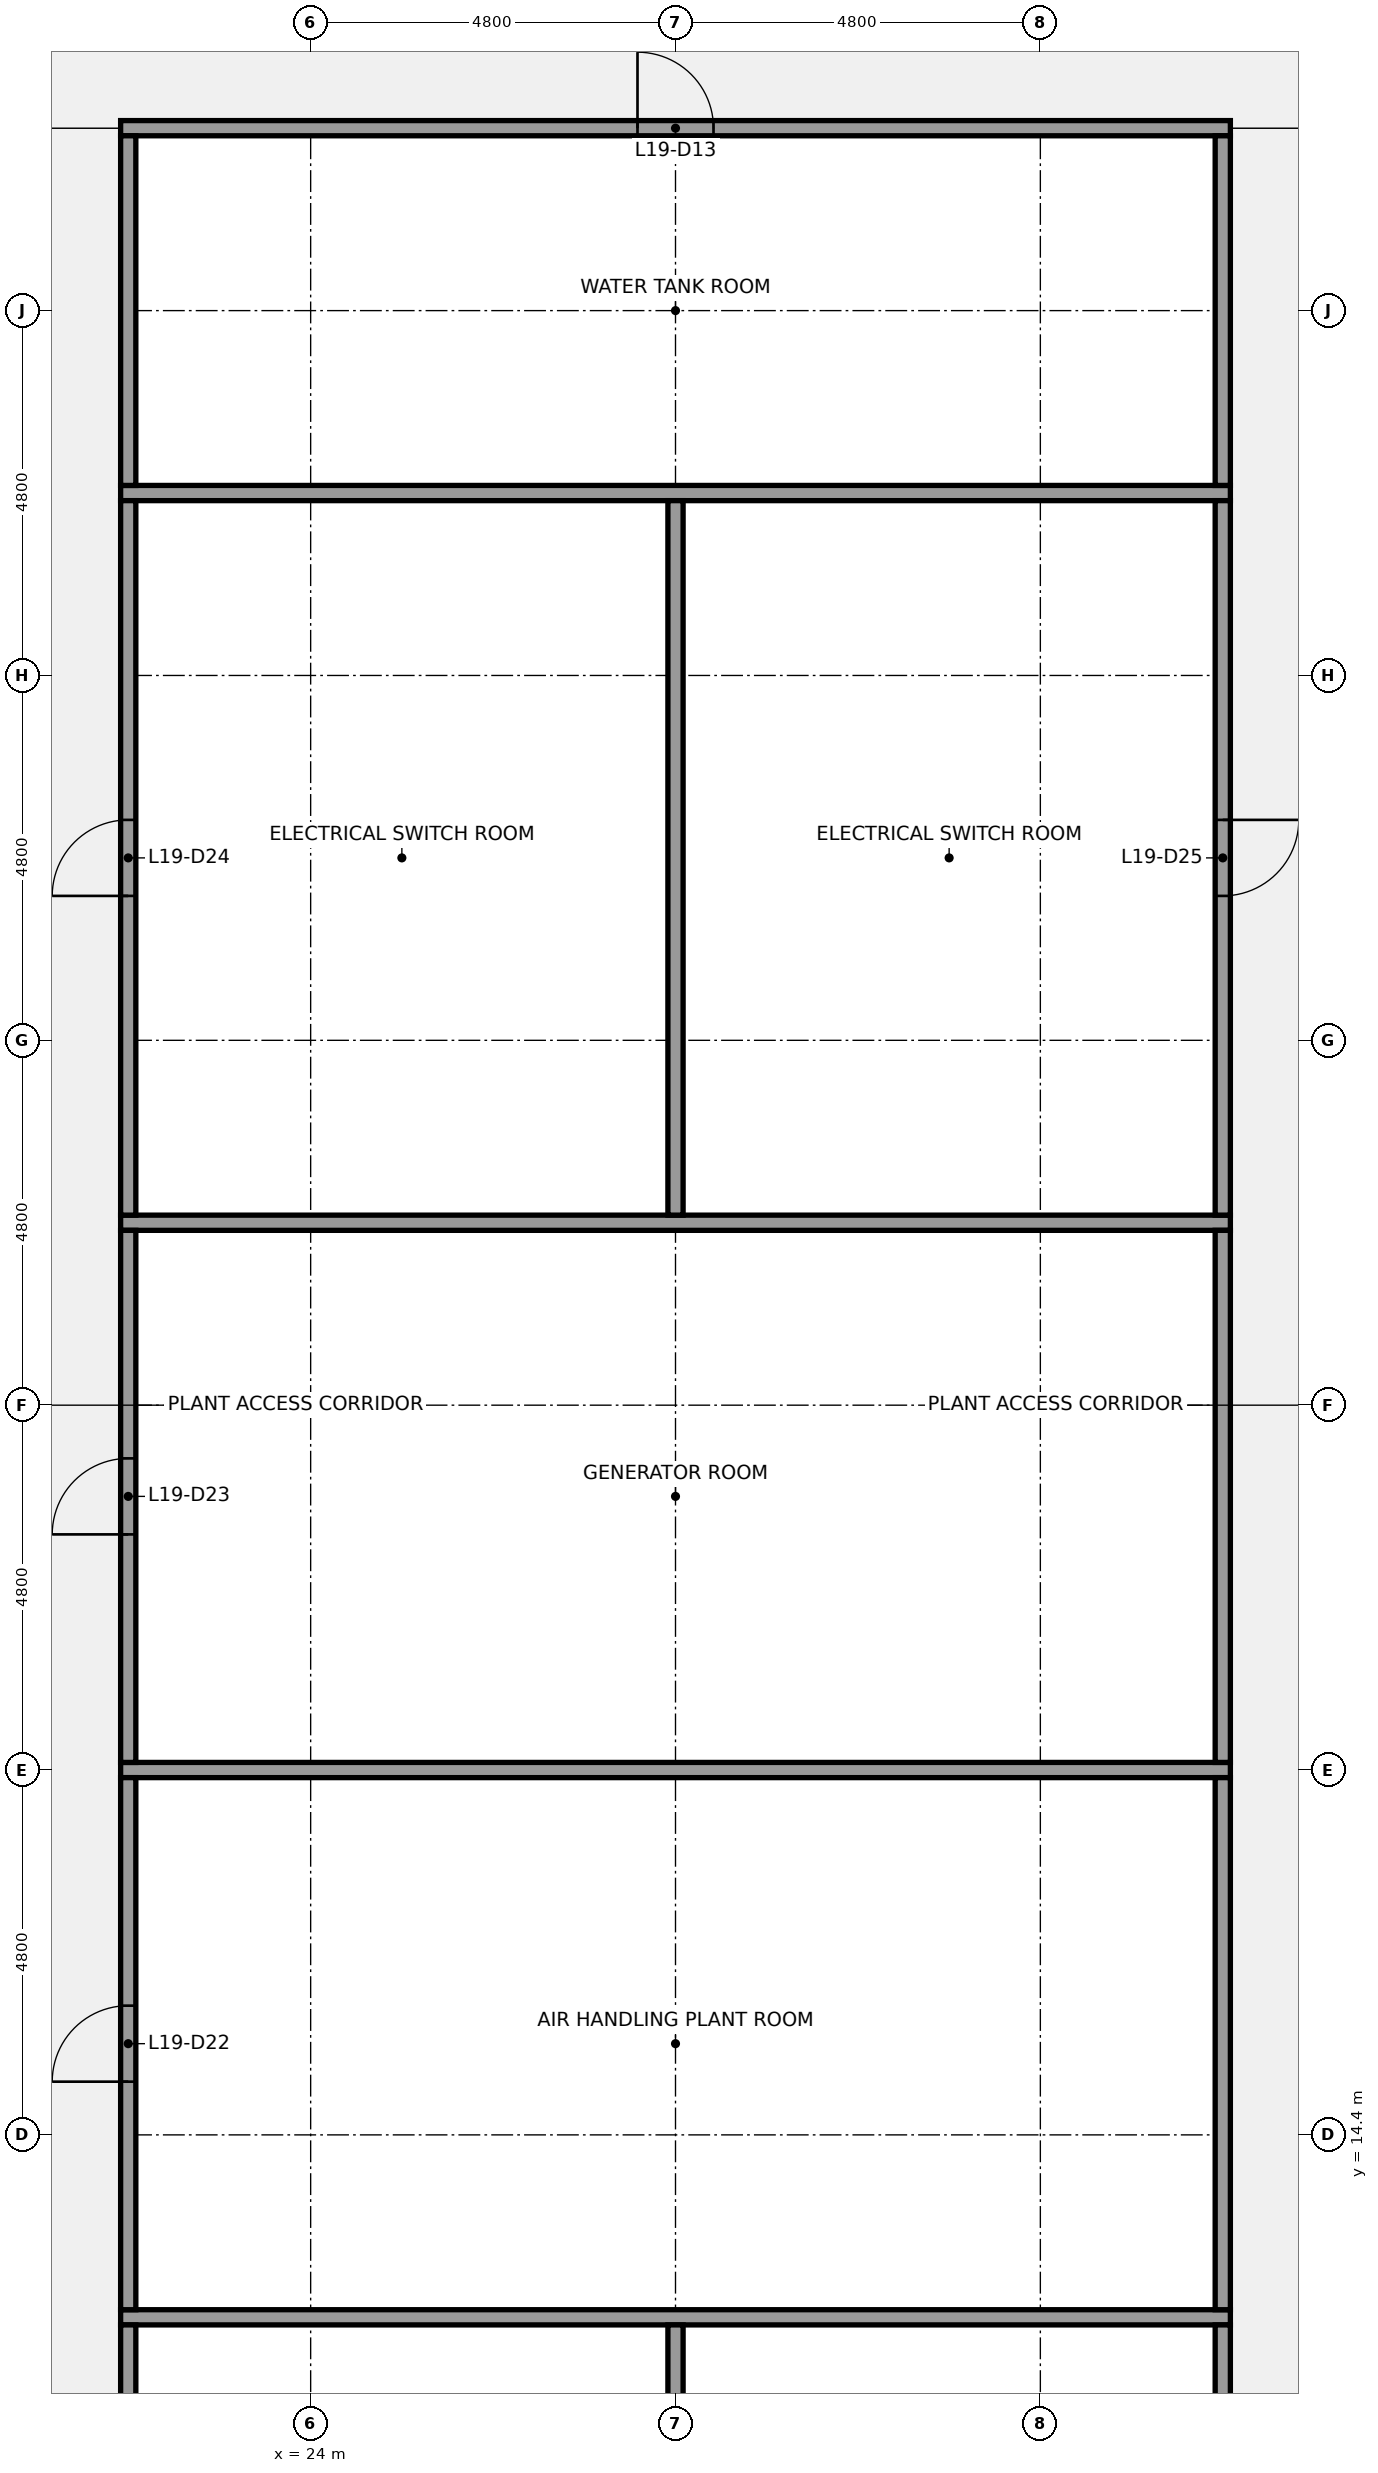
"""IFC4 building model, lengths in metres.
Left out: names, types, materials, properties, quantities, classifications, styles, units other than length and angle.
Written with IfcOpenShell. Run it as: python <this file> out.ifc"""

import sys

from ifc_helpers import new_model, si_unit, direction, frame, frame_2d, origin, place, context, subcontext, project, spatial, rectangle, extrude, element, fill, save


model = new_model("IFC4")
c1 = context("Model", 3, precision=1e-05, world=origin(), true_north=direction((0.0, 1.0)))
c2 = subcontext(c1, "Body", "Model", "MODEL_VIEW")
j1 = project(units=[si_unit("LENGTHUNIT", "METRE"), si_unit("PLANEANGLEUNIT", "RADIAN")], contexts=[c1])
p1 = place(None, origin())
s1 = spatial("IfcSite", under=j1, at=p1, CompositionType="ELEMENT")
p2 = place(p1, origin())
s2 = spatial("IfcBuilding", under=s1, at=p2, CompositionType="ELEMENT")
p3 = place(p2, frame((0.0, 0.0, 87.0)))
s3 = spatial("IfcBuildingStorey", under=s2, at=p3, CompositionType="ELEMENT", Elevation=87.0)
for number, where, z_axis, x_axis in (
    (1, (21.5, 12.0, 0.0), (0.0, 0.0, 1.0), (1.0, 0.0, 0.0)),
    (2, (21.5, 19.2, 0.0), (0.0, 0.0, 1.0), (1.0, 0.0, 0.0)),
    (3, (21.5, 26.4, 0.0), (0.0, 0.0, 1.0), (1.0, 0.0, 0.0)),
    (4, (21.5, 36.0, 0.0), (0.0, 0.0, 1.0), (1.0, 0.0, 0.0)),
):
    element("IfcWall", number, at=place(p3, frame(where, z_axis=z_axis, x_axis=x_axis)), inside=s3, PredefinedType="PARTITIONING", context=c2, shape_type="SweptSolid", body=[
        extrude(rectangle(XDim=14.6, YDim=0.2, at=frame_2d((7.3, 0.0))), origin(), (0.0, 0.0, 1.0), 2.993),
    ])
p4 = place(p3, frame((21.5, 40.8, 0.0), z_axis=(0.0, 0.0, 1.0), x_axis=(1.0, 0.0, 0.0)))
e5 = element("IfcWall", 5, at=p4, inside=s3, PredefinedType="PARTITIONING", context=c2, shape_type="SweptSolid", body=[
    extrude(rectangle(XDim=14.6, YDim=0.2, at=frame_2d((7.3, 0.0))), origin(), (0.0, 0.0, 1.0), 2.993),
])
p5 = place(p4, frame((6.8, 0.0, 0.0)))
e6 = element("IfcOpeningElement", 6, at=p5, cuts=e5, PredefinedType="OPENING", context=c2, shape_type="SweptSolid", body=[
    extrude(rectangle(XDim=1.0, YDim=2.1, at=frame_2d((0.5, 1.05))), frame((0.0, 0.11, 0.0), z_axis=(0.0, -1.0, 0.0), x_axis=(1.0, 0.0, 0.0)), (0.0, 0.0, 1.0), 0.22),
])
p6 = place(p3, frame((21.6, 7.3, 0.0), z_axis=(0.0, 0.0, 1.0), x_axis=(0.0, 1.0, 0.0)))
e7 = element("IfcWall", 7, at=p6, inside=s3, PredefinedType="PARTITIONING", context=c2, shape_type="SweptSolid", body=[
    extrude(rectangle(XDim=4.6, YDim=0.2, at=frame_2d((2.3, 0.0))), origin(), (0.0, 0.0, 1.0), 2.993),
])
p7 = place(p3, frame((21.6, 12.1, 0.0), z_axis=(0.0, 0.0, 1.0), x_axis=(0.0, 1.0, 0.0)))
e8 = element("IfcWall", 8, at=p7, inside=s3, PredefinedType="PARTITIONING", context=c2, shape_type="SweptSolid", body=[
    extrude(rectangle(XDim=7.0, YDim=0.2, at=frame_2d((3.5, 0.0))), origin(), (0.0, 0.0, 1.0), 2.993),
])
p8 = place(p7, frame((3.0, 0.0, 0.0)))
e9 = element("IfcOpeningElement", 9, at=p8, cuts=e8, PredefinedType="OPENING", context=c2, shape_type="SweptSolid", body=[
    extrude(rectangle(XDim=1.0, YDim=2.1, at=frame_2d((0.5, 1.05))), frame((0.0, 0.11, 0.0), z_axis=(0.0, -1.0, 0.0), x_axis=(1.0, 0.0, 0.0)), (0.0, 0.0, 1.0), 0.22),
])
p9 = place(p3, frame((21.6, 19.3, 0.0), z_axis=(0.0, 0.0, 1.0), x_axis=(0.0, 1.0, 0.0)))
e10 = element("IfcWall", 10, at=p9, inside=s3, PredefinedType="PARTITIONING", context=c2, shape_type="SweptSolid", body=[
    extrude(rectangle(XDim=7.0, YDim=0.2, at=frame_2d((3.5, 0.0))), origin(), (0.0, 0.0, 1.0), 2.993),
])
p10 = place(p9, frame((3.0, 0.0, 0.0)))
e11 = element("IfcOpeningElement", 11, at=p10, cuts=e10, PredefinedType="OPENING", context=c2, shape_type="SweptSolid", body=[
    extrude(rectangle(XDim=1.0, YDim=2.1, at=frame_2d((0.5, 1.05))), frame((0.0, 0.11, 0.0), z_axis=(0.0, -1.0, 0.0), x_axis=(1.0, 0.0, 0.0)), (0.0, 0.0, 1.0), 0.22),
])
p11 = place(p3, frame((21.6, 26.5, 0.0), z_axis=(0.0, 0.0, 1.0), x_axis=(0.0, 1.0, 0.0)))
e12 = element("IfcWall", 12, at=p11, inside=s3, PredefinedType="PARTITIONING", context=c2, shape_type="SweptSolid", body=[
    extrude(rectangle(XDim=9.4, YDim=0.2, at=frame_2d((4.7, 0.0))), origin(), (0.0, 0.0, 1.0), 2.993),
])
p12 = place(p11, frame((4.2, 0.0, 0.0)))
e13 = element("IfcOpeningElement", 13, at=p12, cuts=e12, PredefinedType="OPENING", context=c2, shape_type="SweptSolid", body=[
    extrude(rectangle(XDim=1.0, YDim=2.1, at=frame_2d((0.5, 1.05))), frame((0.0, 0.11, 0.0), z_axis=(0.0, -1.0, 0.0), x_axis=(1.0, 0.0, 0.0)), (0.0, 0.0, 1.0), 0.22),
])
for number, where, z_axis, x_axis in (
    (14, (21.6, 36.1, 0.0), (0.0, 0.0, 1.0), (0.0, 1.0, 0.0)),
    (15, (28.8, 7.3, 0.0), (0.0, 0.0, 1.0), (0.0, 1.0, 0.0)),
):
    element("IfcWall", number, at=place(p3, frame(where, z_axis=z_axis, x_axis=x_axis)), inside=s3, PredefinedType="PARTITIONING", context=c2, shape_type="SweptSolid", body=[
        extrude(rectangle(XDim=4.6, YDim=0.2, at=frame_2d((2.3, 0.0))), origin(), (0.0, 0.0, 1.0), 2.993),
    ])
p13 = place(p3, frame((28.8, 26.5, 0.0), z_axis=(0.0, 0.0, 1.0), x_axis=(0.0, 1.0, 0.0)))
e16 = element("IfcWall", 16, at=p13, inside=s3, PredefinedType="PARTITIONING", context=c2, shape_type="SweptSolid", body=[
    extrude(rectangle(XDim=9.4, YDim=0.2, at=frame_2d((4.7, 0.0))), origin(), (0.0, 0.0, 1.0), 2.993),
])
p14 = place(p3, frame((36.0, 7.3, 0.0), z_axis=(0.0, 0.0, 1.0), x_axis=(0.0, 1.0, 0.0)))
e17 = element("IfcWall", 17, at=p14, inside=s3, PredefinedType="PARTITIONING", context=c2, shape_type="SweptSolid", body=[
    extrude(rectangle(XDim=4.6, YDim=0.2, at=frame_2d((2.3, 0.0))), origin(), (0.0, 0.0, 1.0), 2.993),
])
for number, where, z_axis, x_axis in (
    (18, (36.0, 12.1, 0.0), (0.0, 0.0, 1.0), (0.0, 1.0, 0.0)),
    (19, (36.0, 19.3, 0.0), (0.0, 0.0, 1.0), (0.0, 1.0, 0.0)),
):
    element("IfcWall", number, at=place(p3, frame(where, z_axis=z_axis, x_axis=x_axis)), inside=s3, PredefinedType="PARTITIONING", context=c2, shape_type="SweptSolid", body=[
        extrude(rectangle(XDim=7.0, YDim=0.2, at=frame_2d((3.5, 0.0))), origin(), (0.0, 0.0, 1.0), 2.993),
    ])
p15 = place(p3, frame((36.0, 26.5, 0.0), z_axis=(0.0, 0.0, 1.0), x_axis=(0.0, 1.0, 0.0)))
e20 = element("IfcWall", 20, at=p15, inside=s3, PredefinedType="PARTITIONING", context=c2, shape_type="SweptSolid", body=[
    extrude(rectangle(XDim=9.4, YDim=0.2, at=frame_2d((4.7, 0.0))), origin(), (0.0, 0.0, 1.0), 2.993),
])
p16 = place(p15, frame((4.2, 0.0, 0.0)))
e21 = element("IfcOpeningElement", 21, at=p16, cuts=e20, PredefinedType="OPENING", context=c2, shape_type="SweptSolid", body=[
    extrude(rectangle(XDim=1.0, YDim=2.1, at=frame_2d((0.5, 1.05))), frame((0.0, 0.11, 0.0), z_axis=(0.0, -1.0, 0.0), x_axis=(1.0, 0.0, 0.0)), (0.0, 0.0, 1.0), 0.22),
])
p17 = place(p3, frame((36.0, 36.1, 0.0), z_axis=(0.0, 0.0, 1.0), x_axis=(0.0, 1.0, 0.0)))
e22 = element("IfcWall", 22, at=p17, inside=s3, PredefinedType="PARTITIONING", context=c2, shape_type="SweptSolid", body=[
    extrude(rectangle(XDim=4.6, YDim=0.2, at=frame_2d((2.3, 0.0))), origin(), (0.0, 0.0, 1.0), 2.993),
])
p18 = place(p5, origin())
e23 = element("IfcDoor", 23, at=p18, inside=s3, OperationType="SINGLE_SWING_LEFT", PredefinedType="DOOR", context=c2, shape_type="SweptSolid", body=[
    extrude(rectangle(XDim=1.0, YDim=2.1, at=frame_2d((0.5, 1.05))), frame((0.0, 0.025, 0.0), z_axis=(0.0, -1.0, 0.0), x_axis=(1.0, 0.0, 0.0)), (0.0, 0.0, 1.0), 0.05),
])
fill(e6, e23)
p19 = place(p8, origin())
e24 = element("IfcDoor", 24, at=p19, inside=s3, OperationType="SINGLE_SWING_LEFT", PredefinedType="DOOR", context=c2, shape_type="SweptSolid", body=[
    extrude(rectangle(XDim=1.0, YDim=2.1, at=frame_2d((0.5, 1.05))), frame((0.0, 0.025, 0.0), z_axis=(0.0, -1.0, 0.0), x_axis=(1.0, 0.0, 0.0)), (0.0, 0.0, 1.0), 0.05),
])
fill(e9, e24)
p20 = place(p10, origin())
e25 = element("IfcDoor", 25, at=p20, inside=s3, OperationType="SINGLE_SWING_LEFT", PredefinedType="DOOR", context=c2, shape_type="SweptSolid", body=[
    extrude(rectangle(XDim=1.0, YDim=2.1, at=frame_2d((0.5, 1.05))), frame((0.0, 0.025, 0.0), z_axis=(0.0, -1.0, 0.0), x_axis=(1.0, 0.0, 0.0)), (0.0, 0.0, 1.0), 0.05),
])
fill(e11, e25)
p21 = place(p12, origin())
e26 = element("IfcDoor", 26, at=p21, inside=s3, OperationType="SINGLE_SWING_LEFT", PredefinedType="DOOR", context=c2, shape_type="SweptSolid", body=[
    extrude(rectangle(XDim=1.0, YDim=2.1, at=frame_2d((0.5, 1.05))), frame((0.0, 0.025, 0.0), z_axis=(0.0, -1.0, 0.0), x_axis=(1.0, 0.0, 0.0)), (0.0, 0.0, 1.0), 0.05),
])
fill(e13, e26)
p22 = place(p16, origin())
e27 = element("IfcDoor", 27, at=p22, inside=s3, OperationType="SINGLE_SWING_RIGHT", PredefinedType="DOOR", context=c2, shape_type="SweptSolid", body=[
    extrude(rectangle(XDim=1.0, YDim=2.1, at=frame_2d((0.5, 1.05))), frame((0.0, 0.025, 0.0), z_axis=(0.0, -1.0, 0.0), x_axis=(1.0, 0.0, 0.0)), (0.0, 0.0, 1.0), 0.05),
])
fill(e21, e27)
save(model, sys.argv[1])
